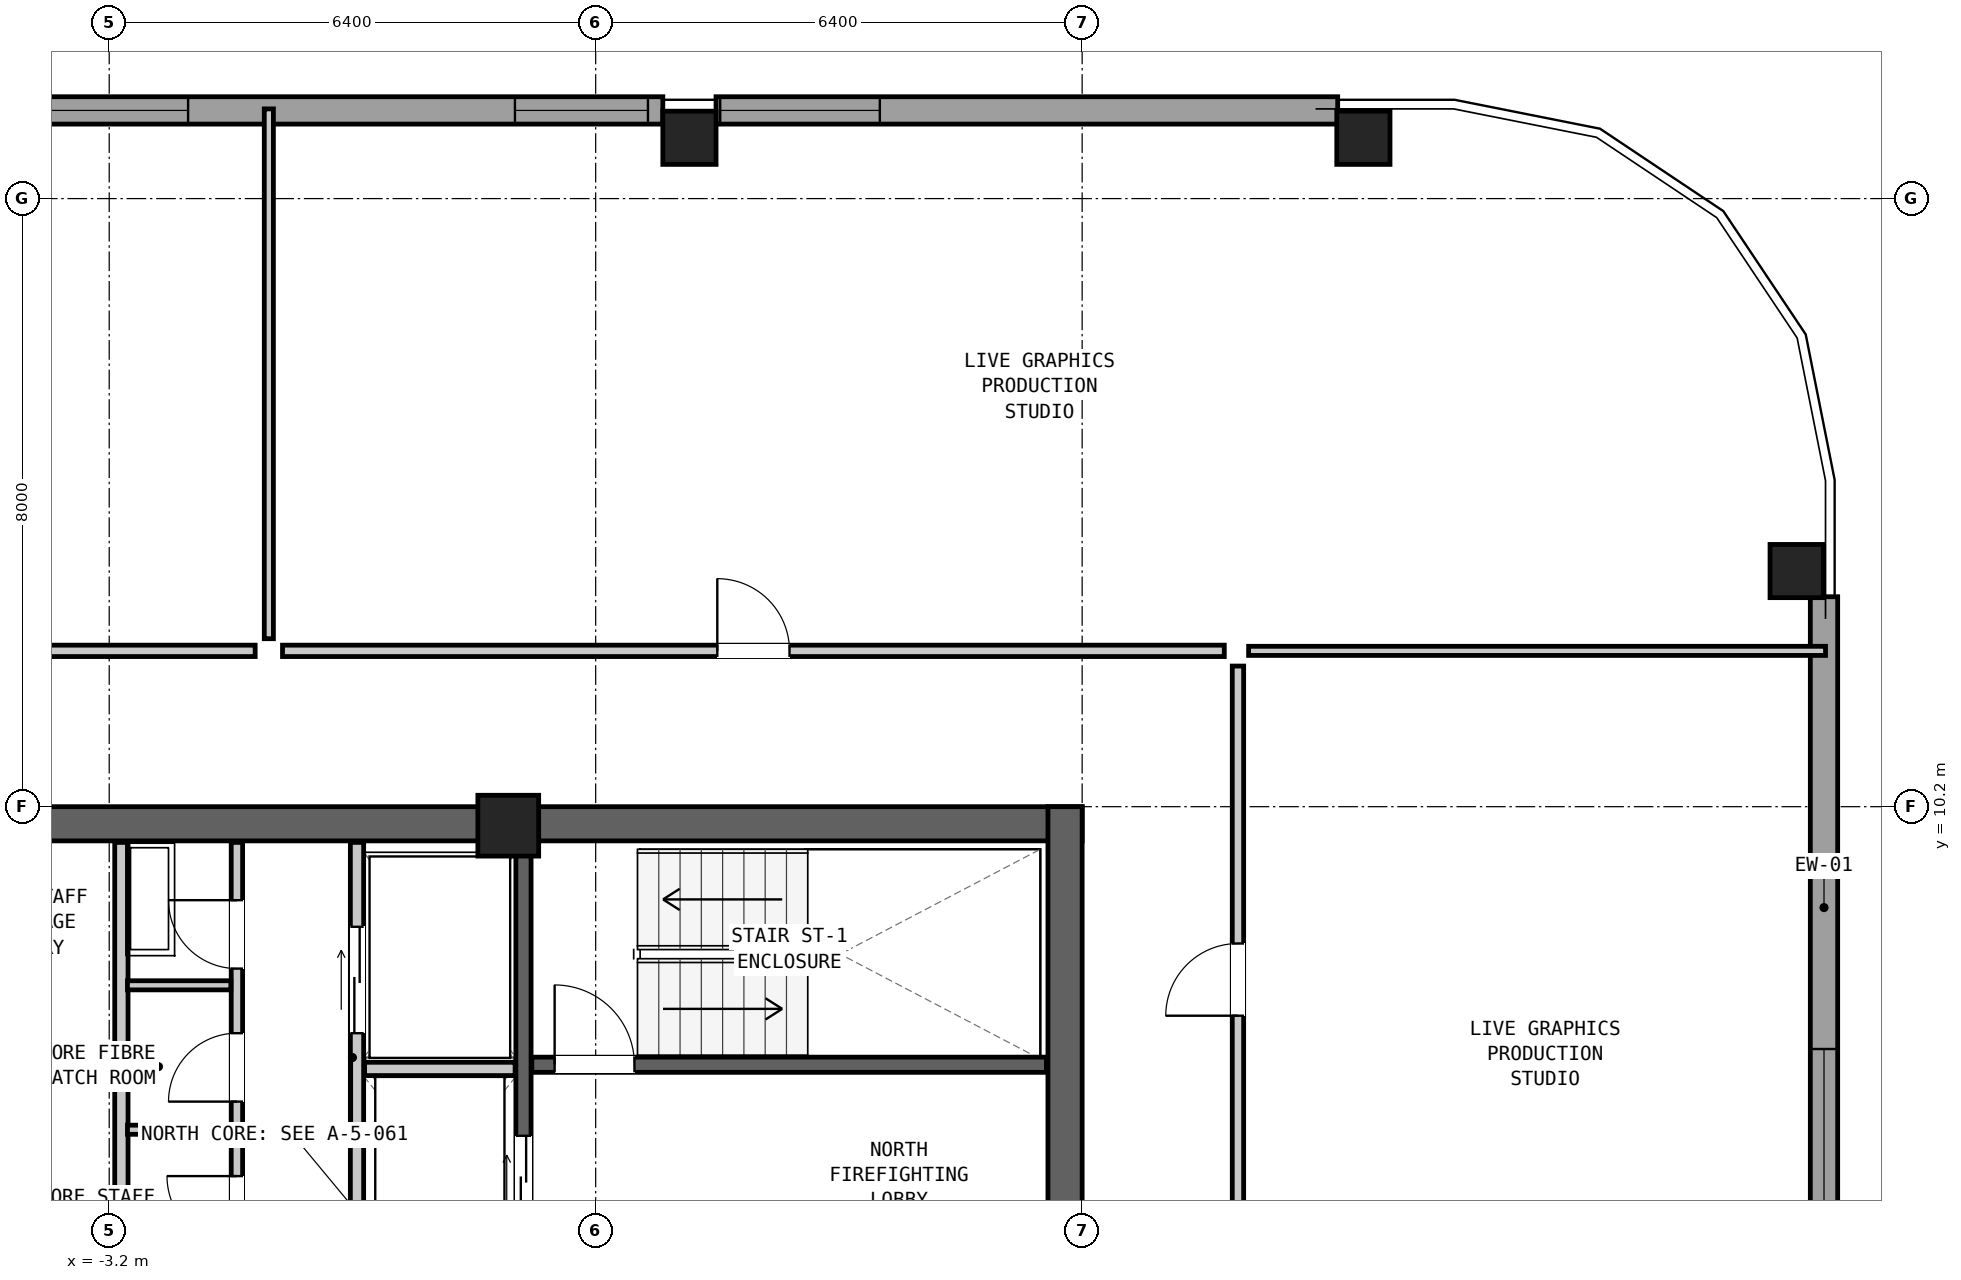
"""IFC4 building model, lengths in metres.
Left out: names, types, materials, properties, quantities, classifications, styles, units other than length and angle.
Written with IfcOpenShell. Run it as: python <this file> out.ifc"""

import sys

from ifc_helpers import new_model, si_unit, direction, frame, frame_2d, origin, origin_2d, place, context, subcontext, project, spatial, rectangle, hollow_rectangle, extrude, element, fill, save


model = new_model("IFC4")
c1 = context("Model", 3, precision=1e-05, world=origin(), true_north=direction((0.0, 1.0)))
c2 = subcontext(c1, "Body", "Model", "MODEL_VIEW")
j1 = project(units=[si_unit("LENGTHUNIT", "METRE"), si_unit("PLANEANGLEUNIT", "RADIAN")], contexts=[c1])
p1 = place(None, origin())
s1 = spatial("IfcSite", under=j1, at=p1, CompositionType="ELEMENT")
p2 = place(p1, origin())
s2 = spatial("IfcBuilding", under=s1, at=p2, CompositionType="ELEMENT")
p3 = place(p2, frame((0.0, 0.0, 199.5)))
s3 = spatial("IfcBuildingStorey", under=s2, at=p3, CompositionType="ELEMENT", Elevation=199.5)
p4 = place(p3, frame((-9.6, 9.975, 0.0), z_axis=(0.0, 0.0, 1.0), x_axis=(1.0, 0.0, 0.0)))
e1 = element("IfcWall", 1, at=p4, inside=s3, PredefinedType="SHEAR", context=c2, shape_type="SweptSolid", body=[
    extrude(rectangle(XDim=19.2, YDim=0.45, at=frame_2d((9.6, 0.0))), origin(), (0.0, 0.0, 1.0), 3.05),
])
p5 = place(p3, frame((9.375, 3.6, 0.0), z_axis=(0.0, 0.0, 1.0), x_axis=(0.0, 1.0, 0.0)))
e2 = element("IfcWall", 2, at=p5, inside=s3, PredefinedType="SHEAR", context=c2, shape_type="SweptSolid", body=[
    extrude(rectangle(XDim=6.6, YDim=0.45, at=frame_2d((3.3, 0.0))), origin(), (0.0, 0.0, 1.0), 3.05),
])
for number, where, z_axis, x_axis in (
    (3, (19.0, 13.3, 0.0), (0.0, 0.0, 1.0), (0.0, 1.0, 0.0)),
    (4, (13.3, 19.0, 0.0), (0.0, 0.0, 1.0), (1.0, 0.0, 0.0)),
    (5, (4.433, 19.0, 0.0), (0.0, 0.0, 1.0), (1.0, 0.0, 0.0)),
):
    element("IfcColumn", number, at=place(p3, frame(where, z_axis=z_axis, x_axis=x_axis)), inside=s3, PredefinedType="COLUMN", context=c2, shape_type="SweptSolid", body=[
        extrude(hollow_rectangle(XDim=0.7, YDim=0.7, WallThickness=0.045, at=origin_2d()), origin(), (0.0, 0.0, 1.0), 3.05),
    ])
p6 = place(p3, frame((2.05, 9.95, 0.0), z_axis=(0.0, 0.0, 1.0), x_axis=(1.0, 0.0, 0.0)))
e6 = element("IfcColumn", 6, at=p6, inside=s3, PredefinedType="COLUMN", context=c2, shape_type="SweptSolid", body=[
    extrude(rectangle(XDim=0.8, YDim=0.8, at=origin_2d()), origin(), (0.0, 0.0, 1.0), 3.05),
])
p7 = place(p3, frame((19.36, 12.962, 0.0), z_axis=(0.0, 0.0, 1.0), x_axis=(0.0, -1.0, 0.0)))
e7 = element("IfcWall", 7, at=p7, inside=s3, PredefinedType="SOLIDWALL", context=c2, shape_type="SweptSolid", body=[
    extrude(rectangle(XDim=8.179, YDim=0.36, at=frame_2d((4.089, 0.0))), origin(), (0.0, 0.0, 1.0), 1.662),
])
p8 = place(p7, frame((5.95, 0.0, 0.2)))
e8 = element("IfcOpeningElement", 8, at=p8, cuts=e7, PredefinedType="OPENING", context=c2, shape_type="SweptSolid", body=[
    extrude(rectangle(XDim=2.15, YDim=1.05, at=frame_2d((1.075, 0.525))), frame((0.0, 0.192, 0.0), z_axis=(0.0, -1.0, 0.0), x_axis=(1.0, 0.0, 0.0)), (0.0, 0.0, 1.0), 0.384),
])
p9 = place(p3, frame((-4.083, 19.36, 0.0), z_axis=(0.0, 0.0, 1.0), x_axis=(1.0, 0.0, 0.0)))
e9 = element("IfcWall", 9, at=p9, inside=s3, PredefinedType="SOLIDWALL", context=c2, shape_type="SweptSolid", body=[
    extrude(rectangle(XDim=8.167, YDim=0.36, at=frame_2d((4.083, 0.0))), origin(), (0.0, 0.0, 1.0), 1.662),
])
p10 = place(p9, frame((0.071, 0.0, 0.2)))
e10 = element("IfcOpeningElement", 10, at=p10, cuts=e9, PredefinedType="OPENING", context=c2, shape_type="SweptSolid", body=[
    extrude(rectangle(XDim=1.85, YDim=0.9, at=frame_2d((0.925, 0.45))), frame((0.0, 0.192, 0.0), z_axis=(0.0, -1.0, 0.0), x_axis=(1.0, 0.0, 0.0)), (0.0, 0.0, 1.0), 0.384),
])
p11 = place(p9, frame((6.221, 0.0, 0.2)))
e11 = element("IfcOpeningElement", 11, at=p11, cuts=e9, PredefinedType="OPENING", context=c2, shape_type="SweptSolid", body=[
    extrude(rectangle(XDim=1.75, YDim=0.9, at=frame_2d((0.875, 0.45))), frame((0.0, 0.192, 0.0), z_axis=(0.0, -1.0, 0.0), x_axis=(1.0, 0.0, 0.0)), (0.0, 0.0, 1.0), 0.384),
])
p12 = place(p3, frame((4.783, 19.36, 0.0), z_axis=(0.0, 0.0, 1.0), x_axis=(1.0, 0.0, 0.0)))
e12 = element("IfcWall", 12, at=p12, inside=s3, PredefinedType="SOLIDWALL", context=c2, shape_type="SweptSolid", body=[
    extrude(rectangle(XDim=8.179, YDim=0.36, at=frame_2d((4.089, 0.0))), origin(), (0.0, 0.0, 1.0), 1.662),
])
p13 = place(p12, frame((0.055, 0.0, 0.2)))
e13 = element("IfcOpeningElement", 13, at=p13, cuts=e12, PredefinedType="OPENING", context=c2, shape_type="SweptSolid", body=[
    extrude(rectangle(XDim=2.1, YDim=1.0, at=frame_2d((1.05, 0.5))), frame((0.0, 0.192, 0.0), z_axis=(0.0, -1.0, 0.0), x_axis=(1.0, 0.0, 0.0)), (0.0, 0.0, 1.0), 0.384),
])
p14 = place(p3, frame((2.36, 6.805, 0.0), z_axis=(0.0, 0.0, 1.0), x_axis=(1.0, 0.0, 0.0)))
e14 = element("IfcWall", 14, at=p14, inside=s3, PredefinedType="SHEAR", context=c2, shape_type="SweptSolid", body=[
    extrude(rectangle(XDim=6.77, YDim=0.2, at=frame_2d((3.385, 0.0))), origin(), (0.0, 0.0, 1.0), 2.86),
])
p15 = place(p14, frame((0.3, 0.0, 0.0)))
e15 = element("IfcOpeningElement", 15, at=p15, cuts=e14, PredefinedType="OPENING", context=c2, shape_type="SweptSolid", body=[
    extrude(rectangle(XDim=1.05, YDim=2.08, at=frame_2d((0.525, 1.04))), frame((0.0, 0.112, 0.0), z_axis=(0.0, -1.0, 0.0), x_axis=(1.0, 0.0, 0.0)), (0.0, 0.0, 1.0), 0.224),
])
p16 = place(p3, frame((2.25, 4.07, 0.0), z_axis=(0.0, 0.0, 1.0), x_axis=(0.0, 1.0, 0.0)))
e16 = element("IfcWall", 16, at=p16, inside=s3, PredefinedType="SHEAR", context=c2, shape_type="SweptSolid", body=[
    extrude(rectangle(XDim=5.66, YDim=0.2, at=frame_2d((2.83, 0.0))), origin(), (0.0, 0.0, 1.0), 2.86),
])
p17 = place(p16, frame((0.65, 0.0, 0.0)))
e17 = element("IfcOpeningElement", 17, at=p17, cuts=e16, PredefinedType="OPENING", context=c2, shape_type="SweptSolid", body=[
    extrude(rectangle(XDim=1.15, YDim=2.08, at=frame_2d((0.575, 1.04))), frame((0.0, 0.112, 0.0), z_axis=(0.0, -1.0, 0.0), x_axis=(1.0, 0.0, 0.0)), (0.0, 0.0, 1.0), 0.224),
])
p18 = place(p3, frame((0.06, 4.07, 0.0), z_axis=(0.0, 0.0, 1.0), x_axis=(0.0, 1.0, 0.0)))
e18 = element("IfcWall", 18, at=p18, inside=s3, PredefinedType="PARTITIONING", context=c2, shape_type="SweptSolid", body=[
    extrude(rectangle(XDim=5.66, YDim=0.175, at=frame_2d((2.83, 0.0))), origin(), (0.0, 0.0, 1.0), 2.86),
])
p19 = place(p18, frame((3.15, 0.0, 0.0)))
e19 = element("IfcOpeningElement", 19, at=p19, cuts=e18, PredefinedType="OPENING", context=c2, shape_type="SweptSolid", body=[
    extrude(rectangle(XDim=1.4, YDim=2.12, at=frame_2d((0.7, 1.06))), frame((0.0, 0.1, 0.0), z_axis=(0.0, -1.0, 0.0), x_axis=(1.0, 0.0, 0.0)), (0.0, 0.0, 1.0), 0.199),
])
p20 = place(p3, frame((0.16, 6.75, 0.0), z_axis=(0.0, 0.0, 1.0), x_axis=(1.0, 0.0, 0.0)))
e20 = element("IfcWall", 20, at=p20, inside=s3, PredefinedType="PARTITIONING", context=c2, shape_type="SweptSolid", body=[
    extrude(rectangle(XDim=1.98, YDim=0.175, at=frame_2d((0.99, 0.0))), origin(), (0.0, 0.0, 1.0), 2.86),
])
p21 = place(p3, frame((-3.04, 4.07, 0.0), z_axis=(0.0, 0.0, 1.0), x_axis=(0.0, 1.0, 0.0)))
e21 = element("IfcWall", 21, at=p21, inside=s3, PredefinedType="PARTITIONING", context=c2, shape_type="SweptSolid", body=[
    extrude(rectangle(XDim=5.66, YDim=0.175, at=frame_2d((2.83, 0.0))), origin(), (0.0, 0.0, 1.0), 2.86),
])
p22 = place(p3, frame((-1.52, 4.07, 0.0), z_axis=(0.0, 0.0, 1.0), x_axis=(0.0, 1.0, 0.0)))
e22 = element("IfcWall", 22, at=p22, inside=s3, PredefinedType="PARTITIONING", context=c2, shape_type="SweptSolid", body=[
    extrude(rectangle(XDim=5.66, YDim=0.15, at=frame_2d((2.83, 0.0))), origin(), (0.0, 0.0, 1.0), 2.86),
])
p23 = place(p22, frame((4.0, 0.0, 0.0)))
e23 = element("IfcOpeningElement", 23, at=p23, cuts=e22, PredefinedType="OPENING", context=c2, shape_type="SweptSolid", body=[
    extrude(rectangle(XDim=0.9, YDim=2.05, at=frame_2d((0.45, 1.025))), frame((0.0, 0.087, 0.0), z_axis=(0.0, -1.0, 0.0), x_axis=(1.0, 0.0, 0.0)), (0.0, 0.0, 1.0), 0.174),
])
p24 = place(p22, frame((2.25, 0.0, 0.0)))
e24 = element("IfcOpeningElement", 24, at=p24, cuts=e22, PredefinedType="OPENING", context=c2, shape_type="SweptSolid", body=[
    extrude(rectangle(XDim=0.9, YDim=2.05, at=frame_2d((0.45, 1.025))), frame((0.0, 0.087, 0.0), z_axis=(0.0, -1.0, 0.0), x_axis=(1.0, 0.0, 0.0)), (0.0, 0.0, 1.0), 0.174),
])
p25 = place(p22, frame((0.35, 0.0, 0.0)))
e25 = element("IfcOpeningElement", 25, at=p25, cuts=e22, PredefinedType="OPENING", context=c2, shape_type="SweptSolid", body=[
    extrude(rectangle(XDim=0.92, YDim=2.1, at=frame_2d((0.46, 1.05))), frame((0.0, 0.087, 0.0), z_axis=(0.0, -1.0, 0.0), x_axis=(1.0, 0.0, 0.0)), (0.0, 0.0, 1.0), 0.174),
])
for number, where, z_axis, x_axis in (
    (26, (-2.96, 5.95, 0.0), (0.0, 0.0, 1.0), (1.0, 0.0, 0.0)),
    (27, (-2.96, 7.85, 0.0), (0.0, 0.0, 1.0), (1.0, 0.0, 0.0)),
):
    element("IfcWall", number, at=place(p3, frame(where, z_axis=z_axis, x_axis=x_axis)), inside=s3, PredefinedType="PARTITIONING", context=c2, shape_type="SweptSolid", body=[
        extrude(rectangle(XDim=1.36, YDim=0.12, at=frame_2d((0.68, 0.0))), origin(), (0.0, 0.0, 1.0), 2.86),
    ])
p26 = place(p3, frame((-9.13, 6.9, 0.0), z_axis=(0.0, 0.0, 1.0), x_axis=(1.0, 0.0, 0.0)))
e28 = element("IfcWall", 28, at=p26, inside=s3, PredefinedType="PARTITIONING", context=c2, shape_type="SweptSolid", body=[
    extrude(rectangle(XDim=6.01, YDim=0.15, at=frame_2d((3.005, 0.0))), origin(), (0.0, 0.0, 1.0), 2.86),
])
p27 = place(p26, frame((0.6, 0.0, 0.0)))
e29 = element("IfcOpeningElement", 29, at=p27, cuts=e28, PredefinedType="OPENING", context=c2, shape_type="SweptSolid", body=[
    extrude(rectangle(XDim=0.95, YDim=2.1, at=frame_2d((0.475, 1.05))), frame((0.0, 0.087, 0.0), z_axis=(0.0, -1.0, 0.0), x_axis=(1.0, 0.0, 0.0)), (0.0, 0.0, 1.0), 0.174),
])
p28 = place(p26, frame((3.4, 0.0, 0.0)))
e30 = element("IfcOpeningElement", 30, at=p28, cuts=e28, PredefinedType="OPENING", context=c2, shape_type="SweptSolid", body=[
    extrude(rectangle(XDim=0.95, YDim=2.1, at=frame_2d((0.475, 1.05))), frame((0.0, 0.087, 0.0), z_axis=(0.0, -1.0, 0.0), x_axis=(1.0, 0.0, 0.0)), (0.0, 0.0, 1.0), 0.174),
])
p29 = place(p3, frame((11.79, 12.25, 0.0), z_axis=(0.0, 0.0, 1.0), x_axis=(1.0, 0.0, 0.0)))
e31 = element("IfcWall", 31, at=p29, inside=s3, PredefinedType="PARTITIONING", context=c2, shape_type="SweptSolid", body=[
    extrude(rectangle(XDim=7.59, YDim=0.12, at=frame_2d((3.795, 0.0))), origin(), (0.0, 0.0, 1.0), 2.86),
])
p30 = place(p3, frame((-1.1, 12.41, 0.0), z_axis=(0.0, 0.0, 1.0), x_axis=(0.0, 1.0, 0.0)))
e32 = element("IfcWall", 32, at=p30, inside=s3, PredefinedType="PARTITIONING", context=c2, shape_type="SweptSolid", body=[
    extrude(rectangle(XDim=6.97, YDim=0.12, at=frame_2d((3.485, 0.0))), origin(), (0.0, 0.0, 1.0), 2.86),
])
p31 = place(p3, frame((-11.12, 12.25, 0.0), z_axis=(0.0, 0.0, 1.0), x_axis=(1.0, 0.0, 0.0)))
e33 = element("IfcWall", 33, at=p31, inside=s3, PredefinedType="PARTITIONING", context=c2, shape_type="SweptSolid", body=[
    extrude(rectangle(XDim=9.84, YDim=0.15, at=frame_2d((4.92, 0.0))), origin(), (0.0, 0.0, 1.0), 2.86),
])
p32 = place(p31, frame((4.445, 0.0, 0.0)))
e34 = element("IfcOpeningElement", 34, at=p32, cuts=e33, PredefinedType="OPENING", context=c2, shape_type="SweptSolid", body=[
    extrude(rectangle(XDim=0.95, YDim=2.1, at=frame_2d((0.475, 1.05))), frame((0.0, 0.087, 0.0), z_axis=(0.0, -1.0, 0.0), x_axis=(1.0, 0.0, 0.0)), (0.0, 0.0, 1.0), 0.174),
])
p33 = place(p3, frame((-0.92, 12.25, 0.0), z_axis=(0.0, 0.0, 1.0), x_axis=(1.0, 0.0, 0.0)))
e35 = element("IfcWall", 35, at=p33, inside=s3, PredefinedType="PARTITIONING", context=c2, shape_type="SweptSolid", body=[
    extrude(rectangle(XDim=12.39, YDim=0.15, at=frame_2d((6.195, 0.0))), origin(), (0.0, 0.0, 1.0), 2.86),
])
p34 = place(p33, frame((5.72, 0.0, 0.0)))
e36 = element("IfcOpeningElement", 36, at=p34, cuts=e35, PredefinedType="OPENING", context=c2, shape_type="SweptSolid", body=[
    extrude(rectangle(XDim=0.95, YDim=2.1, at=frame_2d((0.475, 1.05))), frame((0.0, 0.087, 0.0), z_axis=(0.0, -1.0, 0.0), x_axis=(1.0, 0.0, 0.0)), (0.0, 0.0, 1.0), 0.174),
])
p35 = place(p3, frame((11.65, 3.8, 0.0), z_axis=(0.0, 0.0, 1.0), x_axis=(0.0, 1.0, 0.0)))
e37 = element("IfcWall", 37, at=p35, inside=s3, PredefinedType="PARTITIONING", context=c2, shape_type="SweptSolid", body=[
    extrude(rectangle(XDim=8.25, YDim=0.15, at=frame_2d((4.125, 0.0))), origin(), (0.0, 0.0, 1.0), 2.86),
])
p36 = place(p35, frame((3.65, 0.0, 0.0)))
e38 = element("IfcOpeningElement", 38, at=p36, cuts=e37, PredefinedType="OPENING", context=c2, shape_type="SweptSolid", body=[
    extrude(rectangle(XDim=0.95, YDim=2.1, at=frame_2d((0.475, 1.05))), frame((0.0, 0.087, 0.0), z_axis=(0.0, -1.0, 0.0), x_axis=(1.0, 0.0, 0.0)), (0.0, 0.0, 1.0), 0.174),
])
p37 = place(p8, origin())
e39 = element("IfcWindow", 39, at=p37, inside=s3, PartitioningType="SINGLE_PANEL", PredefinedType="WINDOW", context=c2, shape_type="SweptSolid", body=[
    extrude(rectangle(XDim=2.15, YDim=1.05, at=frame_2d((1.075, 0.525))), frame((0.0, 0.03, 0.0), z_axis=(0.0, -1.0, 0.0), x_axis=(1.0, 0.0, 0.0)), (0.0, 0.0, 1.0), 0.06),
])
fill(e8, e39)
p38 = place(p10, origin())
e40 = element("IfcWindow", 40, at=p38, inside=s3, PartitioningType="SINGLE_PANEL", PredefinedType="WINDOW", context=c2, shape_type="SweptSolid", body=[
    extrude(rectangle(XDim=1.85, YDim=0.9, at=frame_2d((0.925, 0.45))), frame((0.0, 0.03, 0.0), z_axis=(0.0, -1.0, 0.0), x_axis=(1.0, 0.0, 0.0)), (0.0, 0.0, 1.0), 0.06),
])
fill(e10, e40)
p39 = place(p11, origin())
e41 = element("IfcWindow", 41, at=p39, inside=s3, PartitioningType="SINGLE_PANEL", PredefinedType="WINDOW", context=c2, shape_type="SweptSolid", body=[
    extrude(rectangle(XDim=1.75, YDim=0.9, at=frame_2d((0.875, 0.45))), frame((0.0, 0.03, 0.0), z_axis=(0.0, -1.0, 0.0), x_axis=(1.0, 0.0, 0.0)), (0.0, 0.0, 1.0), 0.06),
])
fill(e11, e41)
p40 = place(p13, origin())
e42 = element("IfcWindow", 42, at=p40, inside=s3, PartitioningType="SINGLE_PANEL", PredefinedType="WINDOW", context=c2, shape_type="SweptSolid", body=[
    extrude(rectangle(XDim=2.1, YDim=1.0, at=frame_2d((1.05, 0.5))), frame((0.0, 0.03, 0.0), z_axis=(0.0, -1.0, 0.0), x_axis=(1.0, 0.0, 0.0)), (0.0, 0.0, 1.0), 0.06),
])
fill(e13, e42)
p41 = place(p15, origin())
e43 = element("IfcDoor", 43, at=p41, inside=s3, OperationType="SINGLE_SWING_LEFT", PredefinedType="DOOR", context=c2, shape_type="SweptSolid", body=[
    extrude(rectangle(XDim=1.05, YDim=2.08, at=frame_2d((0.525, 1.04))), frame((0.0, 0.025, 0.0), z_axis=(0.0, -1.0, 0.0), x_axis=(1.0, 0.0, 0.0)), (0.0, 0.0, 1.0), 0.05),
])
fill(e15, e43)
p42 = place(p17, origin())
e44 = element("IfcDoor", 44, at=p42, inside=s3, OperationType="DOUBLE_DOOR_SLIDING", PredefinedType="DOOR", context=c2, shape_type="SweptSolid", body=[
    extrude(rectangle(XDim=1.15, YDim=2.08, at=frame_2d((0.575, 1.04))), frame((0.0, 0.025, 0.0), z_axis=(0.0, -1.0, 0.0), x_axis=(1.0, 0.0, 0.0)), (0.0, 0.0, 1.0), 0.05),
])
fill(e17, e44)
p43 = place(p19, origin())
e45 = element("IfcDoor", 45, at=p43, inside=s3, OperationType="DOUBLE_DOOR_SLIDING", PredefinedType="DOOR", context=c2, shape_type="SweptSolid", body=[
    extrude(rectangle(XDim=1.4, YDim=2.12, at=frame_2d((0.7, 1.06))), frame((0.0, 0.025, 0.0), z_axis=(0.0, -1.0, 0.0), x_axis=(1.0, 0.0, 0.0)), (0.0, 0.0, 1.0), 0.05),
])
fill(e19, e45)
p44 = place(p23, origin())
e46 = element("IfcDoor", 46, at=p44, inside=s3, OperationType="SINGLE_SWING_RIGHT", PredefinedType="DOOR", context=c2, shape_type="SweptSolid", body=[
    extrude(rectangle(XDim=0.9, YDim=2.05, at=frame_2d((0.45, 1.025))), frame((0.0, 0.025, 0.0), z_axis=(0.0, -1.0, 0.0), x_axis=(1.0, 0.0, 0.0)), (0.0, 0.0, 1.0), 0.05),
])
fill(e23, e46)
p45 = place(p24, origin())
e47 = element("IfcDoor", 47, at=p45, inside=s3, OperationType="SINGLE_SWING_LEFT", PredefinedType="DOOR", context=c2, shape_type="SweptSolid", body=[
    extrude(rectangle(XDim=0.9, YDim=2.05, at=frame_2d((0.45, 1.025))), frame((0.0, 0.025, 0.0), z_axis=(0.0, -1.0, 0.0), x_axis=(1.0, 0.0, 0.0)), (0.0, 0.0, 1.0), 0.05),
])
fill(e24, e47)
p46 = place(p25, origin())
e48 = element("IfcDoor", 48, at=p46, inside=s3, OperationType="SINGLE_SWING_RIGHT", PredefinedType="DOOR", context=c2, shape_type="SweptSolid", body=[
    extrude(rectangle(XDim=0.92, YDim=2.1, at=frame_2d((0.46, 1.05))), frame((0.0, 0.025, 0.0), z_axis=(0.0, -1.0, 0.0), x_axis=(1.0, 0.0, 0.0)), (0.0, 0.0, 1.0), 0.05),
])
fill(e25, e48)
p47 = place(p34, origin())
e49 = element("IfcDoor", 49, at=p47, inside=s3, OperationType="SINGLE_SWING_LEFT", PredefinedType="DOOR", context=c2, shape_type="SweptSolid", body=[
    extrude(rectangle(XDim=0.95, YDim=2.1, at=frame_2d((0.475, 1.05))), frame((0.0, 0.025, 0.0), z_axis=(0.0, -1.0, 0.0), x_axis=(1.0, 0.0, 0.0)), (0.0, 0.0, 1.0), 0.05),
])
fill(e36, e49)
p48 = place(p36, origin())
e50 = element("IfcDoor", 50, at=p48, inside=s3, OperationType="SINGLE_SWING_LEFT", PredefinedType="DOOR", context=c2, shape_type="SweptSolid", body=[
    extrude(rectangle(XDim=0.95, YDim=2.1, at=frame_2d((0.475, 1.05))), frame((0.0, 0.025, 0.0), z_axis=(0.0, -1.0, 0.0), x_axis=(1.0, 0.0, 0.0)), (0.0, 0.0, 1.0), 0.05),
])
fill(e38, e50)
save(model, sys.argv[1])
